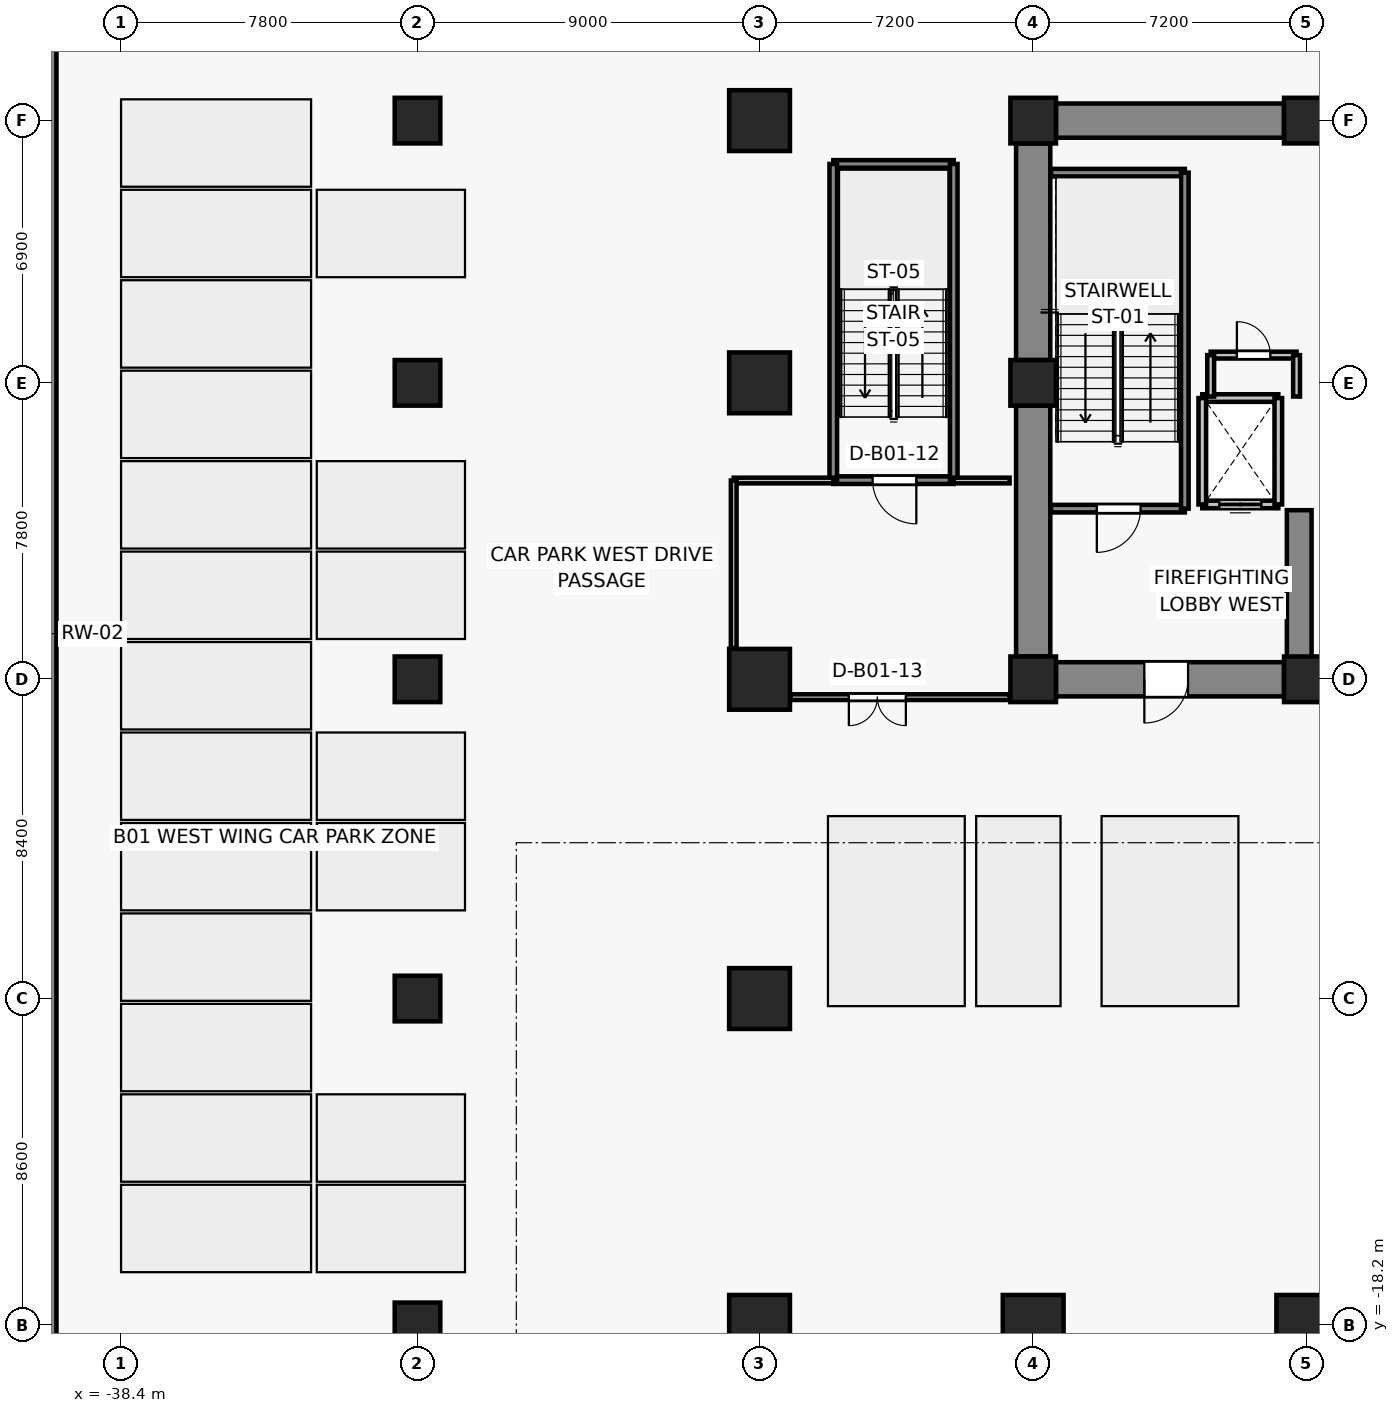
"""IFC4 building model, lengths in metres.
Left out: names, types, materials, properties, quantities, classifications, styles, units other than length and angle.
Written with IfcOpenShell. Run it as: python <this file> out.ifc"""

import sys

from ifc_helpers import new_model, si_unit, direction, frame, frame_2d, origin, origin_2d, place, context, subcontext, project, spatial, rectangle, extrude, source, transform, mapped, element, fill, save


model = new_model("IFC4")
c1 = context("Model", 3, precision=1e-05, world=origin(), true_north=direction((0.0, 1.0)))
c2 = subcontext(c1, "Body", "Model", "MODEL_VIEW")
j1 = project(units=[si_unit("LENGTHUNIT", "METRE"), si_unit("PLANEANGLEUNIT", "RADIAN")], contexts=[c1])
p1 = place(None, origin())
s1 = spatial("IfcSite", under=j1, at=p1, CompositionType="ELEMENT")
p2 = place(p1, origin())
s2 = spatial("IfcBuilding", under=s1, at=p2, CompositionType="ELEMENT")
p3 = place(p2, frame((0.0, 0.0, -4.4)))
s3 = spatial("IfcBuildingStorey", under=s2, at=p3, CompositionType="ELEMENT", Elevation=-4.4)
p4 = place(p3, frame((-40.45, -22.85, 0.0), z_axis=(0.0, 0.0, 1.0), x_axis=(0.0, 1.0, 0.0)))
e1 = element("IfcWall", 1, at=p4, inside=s3, PredefinedType="USERDEFINED", context=c2, shape_type="SweptSolid", body=[
    extrude(rectangle(XDim=45.7, YDim=0.7, at=frame_2d((22.85, 0.0))), origin(), (0.0, 0.0, 1.0), 4.1),
])
for number, where, z_axis, x_axis in (
    (2, (-14.4, -1.2, 0.0), (0.0, 0.0, 1.0), (1.0, 0.0, 0.0)),
    (3, (-7.2, -1.2, 0.0), (0.0, 0.0, 1.0), (1.0, 0.0, 0.0)),
    (4, (-14.4, 6.6, 0.0), (0.0, 0.0, 1.0), (1.0, 0.0, 0.0)),
    (5, (-14.4, 13.5, 0.0), (0.0, 0.0, 1.0), (1.0, 0.0, 0.0)),
    (6, (-7.2, 13.5, 0.0), (0.0, 0.0, 1.0), (1.0, 0.0, 0.0)),
):
    element("IfcColumn", number, at=place(p3, frame(where, z_axis=z_axis, x_axis=x_axis)), inside=s3, PredefinedType="COLUMN", context=c2, shape_type="SweptSolid", body=[
        extrude(rectangle(XDim=1.2, YDim=1.2, at=origin_2d()), origin(), (0.0, 0.0, 1.0), 4.4),
    ])
for number, where, z_axis, x_axis in (
    (7, (-21.6, -18.2, 0.0), (0.0, 0.0, 1.0), (1.0, 0.0, 0.0)),
    (8, (-14.4, -18.2, 0.0), (0.0, 0.0, 1.0), (1.0, 0.0, 0.0)),
    (9, (-7.2, -18.2, 0.0), (0.0, 0.0, 1.0), (1.0, 0.0, 0.0)),
    (10, (-21.6, -9.6, 0.0), (0.0, 0.0, 1.0), (1.0, 0.0, 0.0)),
    (11, (-21.6, -1.2, 0.0), (0.0, 0.0, 1.0), (1.0, 0.0, 0.0)),
    (12, (-21.6, 6.6, 0.0), (0.0, 0.0, 1.0), (1.0, 0.0, 0.0)),
    (13, (-21.6, 13.5, 0.0), (0.0, 0.0, 1.0), (1.0, 0.0, 0.0)),
):
    element("IfcColumn", number, at=place(p3, frame(where, z_axis=z_axis, x_axis=x_axis)), inside=s3, PredefinedType="COLUMN", context=c2, shape_type="SweptSolid", body=[
        extrude(rectangle(XDim=1.6, YDim=1.6, at=origin_2d()), origin(), (0.0, 0.0, 1.0), 4.4),
    ])
for number, where, z_axis, x_axis in (
    (14, (-30.6, -18.2, 0.0), (0.0, 0.0, 1.0), (1.0, 0.0, 0.0)),
    (15, (-30.6, -9.6, 0.0), (0.0, 0.0, 1.0), (1.0, 0.0, 0.0)),
    (16, (-30.6, -1.2, 0.0), (0.0, 0.0, 1.0), (1.0, 0.0, 0.0)),
    (17, (-30.6, 6.6, 0.0), (0.0, 0.0, 1.0), (1.0, 0.0, 0.0)),
    (18, (-30.6, 13.5, 0.0), (0.0, 0.0, 1.0), (1.0, 0.0, 0.0)),
):
    element("IfcColumn", number, at=place(p3, frame(where, z_axis=z_axis, x_axis=x_axis)), inside=s3, PredefinedType="COLUMN", context=c2, shape_type="SweptSolid", body=[
        extrude(rectangle(XDim=1.2, YDim=1.2, at=origin_2d()), origin(), (0.0, 0.0, 1.0), 4.4),
    ])
p5 = place(p3, frame((-13.8, 13.5, 0.0), z_axis=(0.0, 0.0, 1.0), x_axis=(1.0, 0.0, 0.0)))
e19 = element("IfcWall", 19, at=p5, inside=s3, PredefinedType="SHEAR", context=c2, shape_type="SweptSolid", body=[
    extrude(rectangle(XDim=6.0, YDim=0.9, at=frame_2d((3.0, 0.0))), origin(), (0.0, 0.0, 1.0), 4.1),
])
p6 = place(p3, frame((-14.4, -0.6, 0.0), z_axis=(0.0, 0.0, 1.0), x_axis=(0.0, 1.0, 0.0)))
e20 = element("IfcWall", 20, at=p6, inside=s3, PredefinedType="SHEAR", context=c2, shape_type="SweptSolid", body=[
    extrude(rectangle(XDim=6.6, YDim=0.9, at=frame_2d((3.3, 0.0))), origin(), (0.0, 0.0, 1.0), 4.1),
])
p7 = place(p3, frame((-14.4, 7.2, 0.0), z_axis=(0.0, 0.0, 1.0), x_axis=(0.0, 1.0, 0.0)))
e21 = element("IfcWall", 21, at=p7, inside=s3, PredefinedType="SHEAR", context=c2, shape_type="SweptSolid", body=[
    extrude(rectangle(XDim=5.7, YDim=0.9, at=frame_2d((2.85, 0.0))), origin(), (0.0, 0.0, 1.0), 4.1),
])
p8 = place(p3, frame((-7.8, -1.2, 0.0), z_axis=(0.0, 0.0, 1.0), x_axis=(-1.0, 0.0, 0.0)))
e22 = element("IfcWall", 22, at=p8, inside=s3, PredefinedType="SHEAR", context=c2, shape_type="SweptSolid", body=[
    extrude(rectangle(XDim=6.0, YDim=0.9, at=frame_2d((3.0, 0.0))), origin(), (0.0, 0.0, 1.0), 4.1),
])
p9 = place(p8, frame((2.525, 0.0, 0.0)))
e23 = element("IfcOpeningElement", 23, at=p9, cuts=e22, PredefinedType="OPENING", context=c2, shape_type="SweptSolid", body=[
    extrude(rectangle(XDim=1.15, YDim=2.15, at=frame_2d((0.575, 1.075))), frame((0.0, 0.46, 0.0), z_axis=(0.0, -1.0, 0.0), x_axis=(1.0, 0.0, 0.0)), (0.0, 0.0, 1.0), 0.92),
])
p10 = place(p3, frame((-7.4, -0.75, 0.0), z_axis=(0.0, 0.0, 1.0), x_axis=(0.0, 1.0, 0.0)))
e24 = element("IfcWall", 24, at=p10, inside=s3, PredefinedType="SHEAR", context=c2, shape_type="SweptSolid", body=[
    extrude(rectangle(XDim=4.0, YDim=0.65, at=frame_2d((2.0, 0.0))), origin(), (0.0, 0.0, 1.0), 4.1),
])
p11 = place(p3, frame((-7.95, 3.4, 0.0), z_axis=(0.0, 0.0, 1.0), x_axis=(-1.0, 0.0, 0.0)))
e25 = element("IfcWall", 25, at=p11, inside=s3, PredefinedType="SOLIDWALL", context=c2, shape_type="SweptSolid", body=[
    extrude(rectangle(XDim=2.0, YDim=0.2, at=frame_2d((1.0, 0.0))), origin(), (0.0, 0.0, 1.0), 4.1),
])
p12 = place(p11, frame((0.45, 0.0, 0.0)))
e26 = element("IfcOpeningElement", 26, at=p12, cuts=e25, PredefinedType="OPENING", context=c2, shape_type="SweptSolid", body=[
    extrude(rectangle(XDim=1.1, YDim=2.2, at=frame_2d((0.55, 1.1))), frame((0.0, 0.11, 0.0), z_axis=(0.0, -1.0, 0.0), x_axis=(1.0, 0.0, 0.0)), (0.0, 0.0, 1.0), 0.22),
])
p13 = place(p3, frame((-9.95, 6.2, 0.0), z_axis=(0.0, 0.0, 1.0), x_axis=(1.0, 0.0, 0.0)))
e27 = element("IfcWall", 27, at=p13, inside=s3, PredefinedType="SOLIDWALL", context=c2, shape_type="SweptSolid", body=[
    extrude(rectangle(XDim=2.0, YDim=0.2, at=frame_2d((1.0, 0.0))), origin(), (0.0, 0.0, 1.0), 4.1),
])
for number, where, z_axis, x_axis in (
    (28, (-9.95, 3.4, 0.0), (0.0, 0.0, 1.0), (0.0, 1.0, 0.0)),
    (29, (-7.95, 6.2, 0.0), (0.0, 0.0, 1.0), (0.0, -1.0, 0.0)),
):
    element("IfcWall", number, at=place(p3, frame(where, z_axis=z_axis, x_axis=x_axis)), inside=s3, PredefinedType="SOLIDWALL", context=c2, shape_type="SweptSolid", body=[
        extrude(rectangle(XDim=2.8, YDim=0.2, at=frame_2d((1.4, 0.0))), origin(), (0.0, 0.0, 1.0), 4.1),
    ])
p14 = place(p3, frame((-10.41, 3.29, 0.0), z_axis=(0.0, 0.0, 1.0), x_axis=(-1.0, 0.0, 0.0)))
e30 = element("IfcWall", 30, at=p14, inside=s3, PredefinedType="SOLIDWALL", context=c2, shape_type="SweptSolid", body=[
    extrude(rectangle(XDim=3.52, YDim=0.2, at=frame_2d((1.76, 0.0))), origin(), (0.0, 0.0, 1.0), 4.1),
])
p15 = place(p14, frame((1.165, 0.0, 0.0)))
e31 = element("IfcOpeningElement", 31, at=p15, cuts=e30, PredefinedType="OPENING", context=c2, shape_type="SweptSolid", body=[
    extrude(rectangle(XDim=1.15, YDim=2.15, at=frame_2d((0.575, 1.075))), frame((0.0, 0.11, 0.0), z_axis=(0.0, -1.0, 0.0), x_axis=(1.0, 0.0, 0.0)), (0.0, 0.0, 1.0), 0.22),
])
p16 = place(p3, frame((-13.93, 12.13, 0.0), z_axis=(0.0, 0.0, 1.0), x_axis=(1.0, 0.0, 0.0)))
e32 = element("IfcWall", 32, at=p16, inside=s3, PredefinedType="SOLIDWALL", context=c2, shape_type="SweptSolid", body=[
    extrude(rectangle(XDim=3.52, YDim=0.2, at=frame_2d((1.76, 0.0))), origin(), (0.0, 0.0, 1.0), 4.1),
])
p17 = place(p3, frame((-10.41, 12.13, 0.0), z_axis=(0.0, 0.0, 1.0), x_axis=(0.0, -1.0, 0.0)))
e33 = element("IfcWall", 33, at=p17, inside=s3, PredefinedType="SOLIDWALL", context=c2, shape_type="SweptSolid", body=[
    extrude(rectangle(XDim=8.84, YDim=0.2, at=frame_2d((4.42, 0.0))), origin(), (0.0, 0.0, 1.0), 4.1),
])
p18 = place(p3, frame((-9.73, 7.33, 0.0), z_axis=(0.0, 0.0, 1.0), x_axis=(1.0, 0.0, 0.0)))
e34 = element("IfcWall", 34, at=p18, inside=s3, PredefinedType="PARTITIONING", context=c2, shape_type="SweptSolid", body=[
    extrude(rectangle(XDim=2.26, YDim=0.18, at=frame_2d((1.13, 0.0))), origin(), (0.0, 0.0, 1.0), 3.19),
])
p19 = place(p18, frame((0.69, 0.0, 0.0)))
e35 = element("IfcOpeningElement", 35, at=p19, cuts=e34, PredefinedType="OPENING", context=c2, shape_type="SweptSolid", body=[
    extrude(rectangle(XDim=0.88, YDim=2.1, at=frame_2d((0.44, 1.05))), frame((0.0, 0.1, 0.0), z_axis=(0.0, -1.0, 0.0), x_axis=(1.0, 0.0, 0.0)), (0.0, 0.0, 1.0), 0.2),
])
p20 = place(p3, frame((-9.73, 6.24, 0.0), z_axis=(0.0, 0.0, 1.0), x_axis=(0.0, 1.0, 0.0)))
e36 = element("IfcWall", 36, at=p20, inside=s3, PredefinedType="PARTITIONING", context=c2, shape_type="SweptSolid", body=[
    extrude(rectangle(XDim=1.09, YDim=0.18, at=frame_2d((0.545, 0.0))), origin(), (0.0, 0.0, 1.0), 4.1),
])
p21 = place(p3, frame((-7.47, 7.33, 0.0), z_axis=(0.0, 0.0, 1.0), x_axis=(0.0, -1.0, 0.0)))
e37 = element("IfcWall", 37, at=p21, inside=s3, PredefinedType="PARTITIONING", context=c2, shape_type="SweptSolid", body=[
    extrude(rectangle(XDim=1.09, YDim=0.18, at=frame_2d((0.545, 0.0))), origin(), (0.0, 0.0, 1.0), 3.19),
])
p22 = place(p3, frame((-16.49, 4.04, 0.0), z_axis=(0.0, 0.0, 1.0), x_axis=(-1.0, 0.0, 0.0)))
e38 = element("IfcWall", 38, at=p22, inside=s3, PredefinedType="SOLIDWALL", context=c2, shape_type="SweptSolid", body=[
    extrude(rectangle(XDim=3.17, YDim=0.2, at=frame_2d((1.585, 0.0))), origin(), (0.0, 0.0, 1.0), 4.1),
])
p23 = place(p22, frame((0.985, 0.0, 0.0)))
e39 = element("IfcOpeningElement", 39, at=p23, cuts=e38, PredefinedType="OPENING", context=c2, shape_type="SweptSolid", body=[
    extrude(rectangle(XDim=1.15, YDim=2.15, at=frame_2d((0.575, 1.075))), frame((0.0, 0.11, 0.0), z_axis=(0.0, -1.0, 0.0), x_axis=(1.0, 0.0, 0.0)), (0.0, 0.0, 1.0), 0.22),
])
p24 = place(p3, frame((-19.66, 12.36, 0.0), z_axis=(0.0, 0.0, 1.0), x_axis=(1.0, 0.0, 0.0)))
e40 = element("IfcWall", 40, at=p24, inside=s3, PredefinedType="SOLIDWALL", context=c2, shape_type="SweptSolid", body=[
    extrude(rectangle(XDim=3.17, YDim=0.2, at=frame_2d((1.585, 0.0))), origin(), (0.0, 0.0, 1.0), 4.1),
])
for number, where, z_axis, x_axis in (
    (41, (-19.66, 4.04, 0.0), (0.0, 0.0, 1.0), (0.0, 1.0, 0.0)),
    (42, (-16.49, 12.36, 0.0), (0.0, 0.0, 1.0), (0.0, -1.0, 0.0)),
):
    element("IfcWall", number, at=place(p3, frame(where, z_axis=z_axis, x_axis=x_axis)), inside=s3, PredefinedType="SOLIDWALL", context=c2, shape_type="SweptSolid", body=[
        extrude(rectangle(XDim=8.32, YDim=0.2, at=frame_2d((4.16, 0.0))), origin(), (0.0, 0.0, 1.0), 4.1),
    ])
p25 = place(p3, frame((-15.02, -1.67, 0.0), z_axis=(0.0, 0.0, 1.0), x_axis=(-1.0, 0.0, 0.0)))
e43 = element("IfcWall", 43, at=p25, inside=s3, PredefinedType="PARTITIONING", context=c2, shape_type="SweptSolid", body=[
    extrude(rectangle(XDim=5.76, YDim=0.15, at=frame_2d((2.88, 0.0))), origin(), (0.0, 0.0, 1.0), 4.1),
])
p26 = place(p25, frame((2.73, 0.0, 0.0)))
e44 = element("IfcOpeningElement", 44, at=p26, cuts=e43, PredefinedType="OPENING", context=c2, shape_type="SweptSolid", body=[
    extrude(rectangle(XDim=1.5, YDim=2.2, at=frame_2d((0.75, 1.1))), frame((0.0, 0.085, 0.0), z_axis=(0.0, -1.0, 0.0), x_axis=(1.0, 0.0, 0.0)), (0.0, 0.0, 1.0), 0.17),
])
p27 = place(p3, frame((-22.28, 4.03, 0.0), z_axis=(0.0, 0.0, 1.0), x_axis=(1.0, 0.0, 0.0)))
e45 = element("IfcWall", 45, at=p27, inside=s3, PredefinedType="PARTITIONING", context=c2, shape_type="SweptSolid", body=[
    extrude(rectangle(XDim=2.62, YDim=0.15, at=frame_2d((1.31, 0.0))), origin(), (0.0, 0.0, 1.0), 3.19),
])
p28 = place(p3, frame((-16.49, 4.03, 0.0), z_axis=(0.0, 0.0, 1.0), x_axis=(1.0, 0.0, 0.0)))
e46 = element("IfcWall", 46, at=p28, inside=s3, PredefinedType="PARTITIONING", context=c2, shape_type="SweptSolid", body=[
    extrude(rectangle(XDim=1.47, YDim=0.15, at=frame_2d((0.735, 0.0))), origin(), (0.0, 0.0, 1.0), 4.1),
])
p29 = place(p3, frame((-22.28, -0.38, 0.0), z_axis=(0.0, 0.0, 1.0), x_axis=(0.0, 1.0, 0.0)))
e47 = element("IfcWall", 47, at=p29, inside=s3, PredefinedType="PARTITIONING", context=c2, shape_type="SweptSolid", body=[
    extrude(rectangle(XDim=4.41, YDim=0.15, at=frame_2d((2.205, 0.0))), origin(), (0.0, 0.0, 1.0), 3.473),
])
m1 = source(origin(), c2, "Body", "SweptSolid", [
    extrude(rectangle(XDim=1.1, YDim=2.2, at=frame_2d((0.55, 1.1))), frame((0.0, 0.025, 0.0), z_axis=(0.0, -1.0, 0.0), x_axis=(1.0, 0.0, 0.0)), (0.0, 0.0, 1.0), 0.05),
])
p30 = place(p12, origin())
e48 = element("IfcDoor", 48, at=p30, inside=s3, OperationType="DOUBLE_DOOR_SLIDING", PredefinedType="DOOR", context=c2, shape_type="MappedRepresentation", body=[
    mapped(m1, transform((0.0, 0.0, 0.0), x_axis=(1.0, 0.0, 0.0), y_axis=(0.0, 1.0, 0.0), z_axis=(0.0, 0.0, 1.0), scale=1.0)),
])
fill(e26, e48)
m2 = source(origin(), c2, "Body", "SweptSolid", [
    extrude(rectangle(XDim=1.15, YDim=2.15, at=frame_2d((0.575, 1.075))), frame((0.0, 0.025, 0.0), z_axis=(0.0, -1.0, 0.0), x_axis=(1.0, 0.0, 0.0)), (0.0, 0.0, 1.0), 0.05),
])
p31 = place(p15, origin())
e49 = element("IfcDoor", 49, at=p31, inside=s3, OperationType="SINGLE_SWING_RIGHT", PredefinedType="DOOR", context=c2, shape_type="MappedRepresentation", body=[
    mapped(m2, transform((0.0, 0.0, 0.0), x_axis=(1.0, 0.0, 0.0), y_axis=(0.0, 1.0, 0.0), z_axis=(0.0, 0.0, 1.0), scale=1.0)),
])
fill(e31, e49)
p32 = place(p9, origin())
e50 = element("IfcDoor", 50, at=p32, inside=s3, OperationType="SINGLE_SWING_RIGHT", PredefinedType="DOOR", context=c2, shape_type="MappedRepresentation", body=[
    mapped(m2, transform((0.0, 0.0, 0.0), x_axis=(1.0, 0.0, 0.0), y_axis=(0.0, 1.0, 0.0), z_axis=(0.0, 0.0, 1.0), scale=1.0)),
])
fill(e23, e50)
p33 = place(p23, origin())
e51 = element("IfcDoor", 51, at=p33, inside=s3, OperationType="SINGLE_SWING_LEFT", PredefinedType="DOOR", context=c2, shape_type="MappedRepresentation", body=[
    mapped(m2, transform((0.0, 0.0, 0.0), x_axis=(1.0, 0.0, 0.0), y_axis=(0.0, 1.0, 0.0), z_axis=(0.0, 0.0, 1.0), scale=1.0)),
])
fill(e39, e51)
m3 = source(origin(), c2, "Body", "SweptSolid", [
    extrude(rectangle(XDim=1.5, YDim=2.2, at=frame_2d((0.75, 1.1))), frame((0.0, 0.025, 0.0), z_axis=(0.0, -1.0, 0.0), x_axis=(1.0, 0.0, 0.0)), (0.0, 0.0, 1.0), 0.05),
])
p34 = place(p26, origin())
e52 = element("IfcDoor", 52, at=p34, inside=s3, OperationType="DOUBLE_DOOR_SINGLE_SWING", PredefinedType="DOOR", context=c2, shape_type="MappedRepresentation", body=[
    mapped(m3, transform((0.0, 0.0, 0.0), x_axis=(1.0, 0.0, 0.0), y_axis=(0.0, 1.0, 0.0), z_axis=(0.0, 0.0, 1.0), scale=1.0)),
])
fill(e44, e52)
m4 = source(origin(), c2, "Body", "SweptSolid", [
    extrude(rectangle(XDim=0.88, YDim=2.1, at=frame_2d((0.44, 1.05))), frame((0.0, 0.025, 0.0), z_axis=(0.0, -1.0, 0.0), x_axis=(1.0, 0.0, 0.0)), (0.0, 0.0, 1.0), 0.05),
])
p35 = place(p19, origin())
e53 = element("IfcDoor", 53, at=p35, inside=s3, OperationType="SINGLE_SWING_LEFT", PredefinedType="DOOR", context=c2, shape_type="MappedRepresentation", body=[
    mapped(m4, transform((0.0, 0.0, 0.0), x_axis=(1.0, 0.0, 0.0), y_axis=(0.0, 1.0, 0.0), z_axis=(0.0, 0.0, 1.0), scale=1.0)),
])
fill(e35, e53)
save(model, sys.argv[1])
